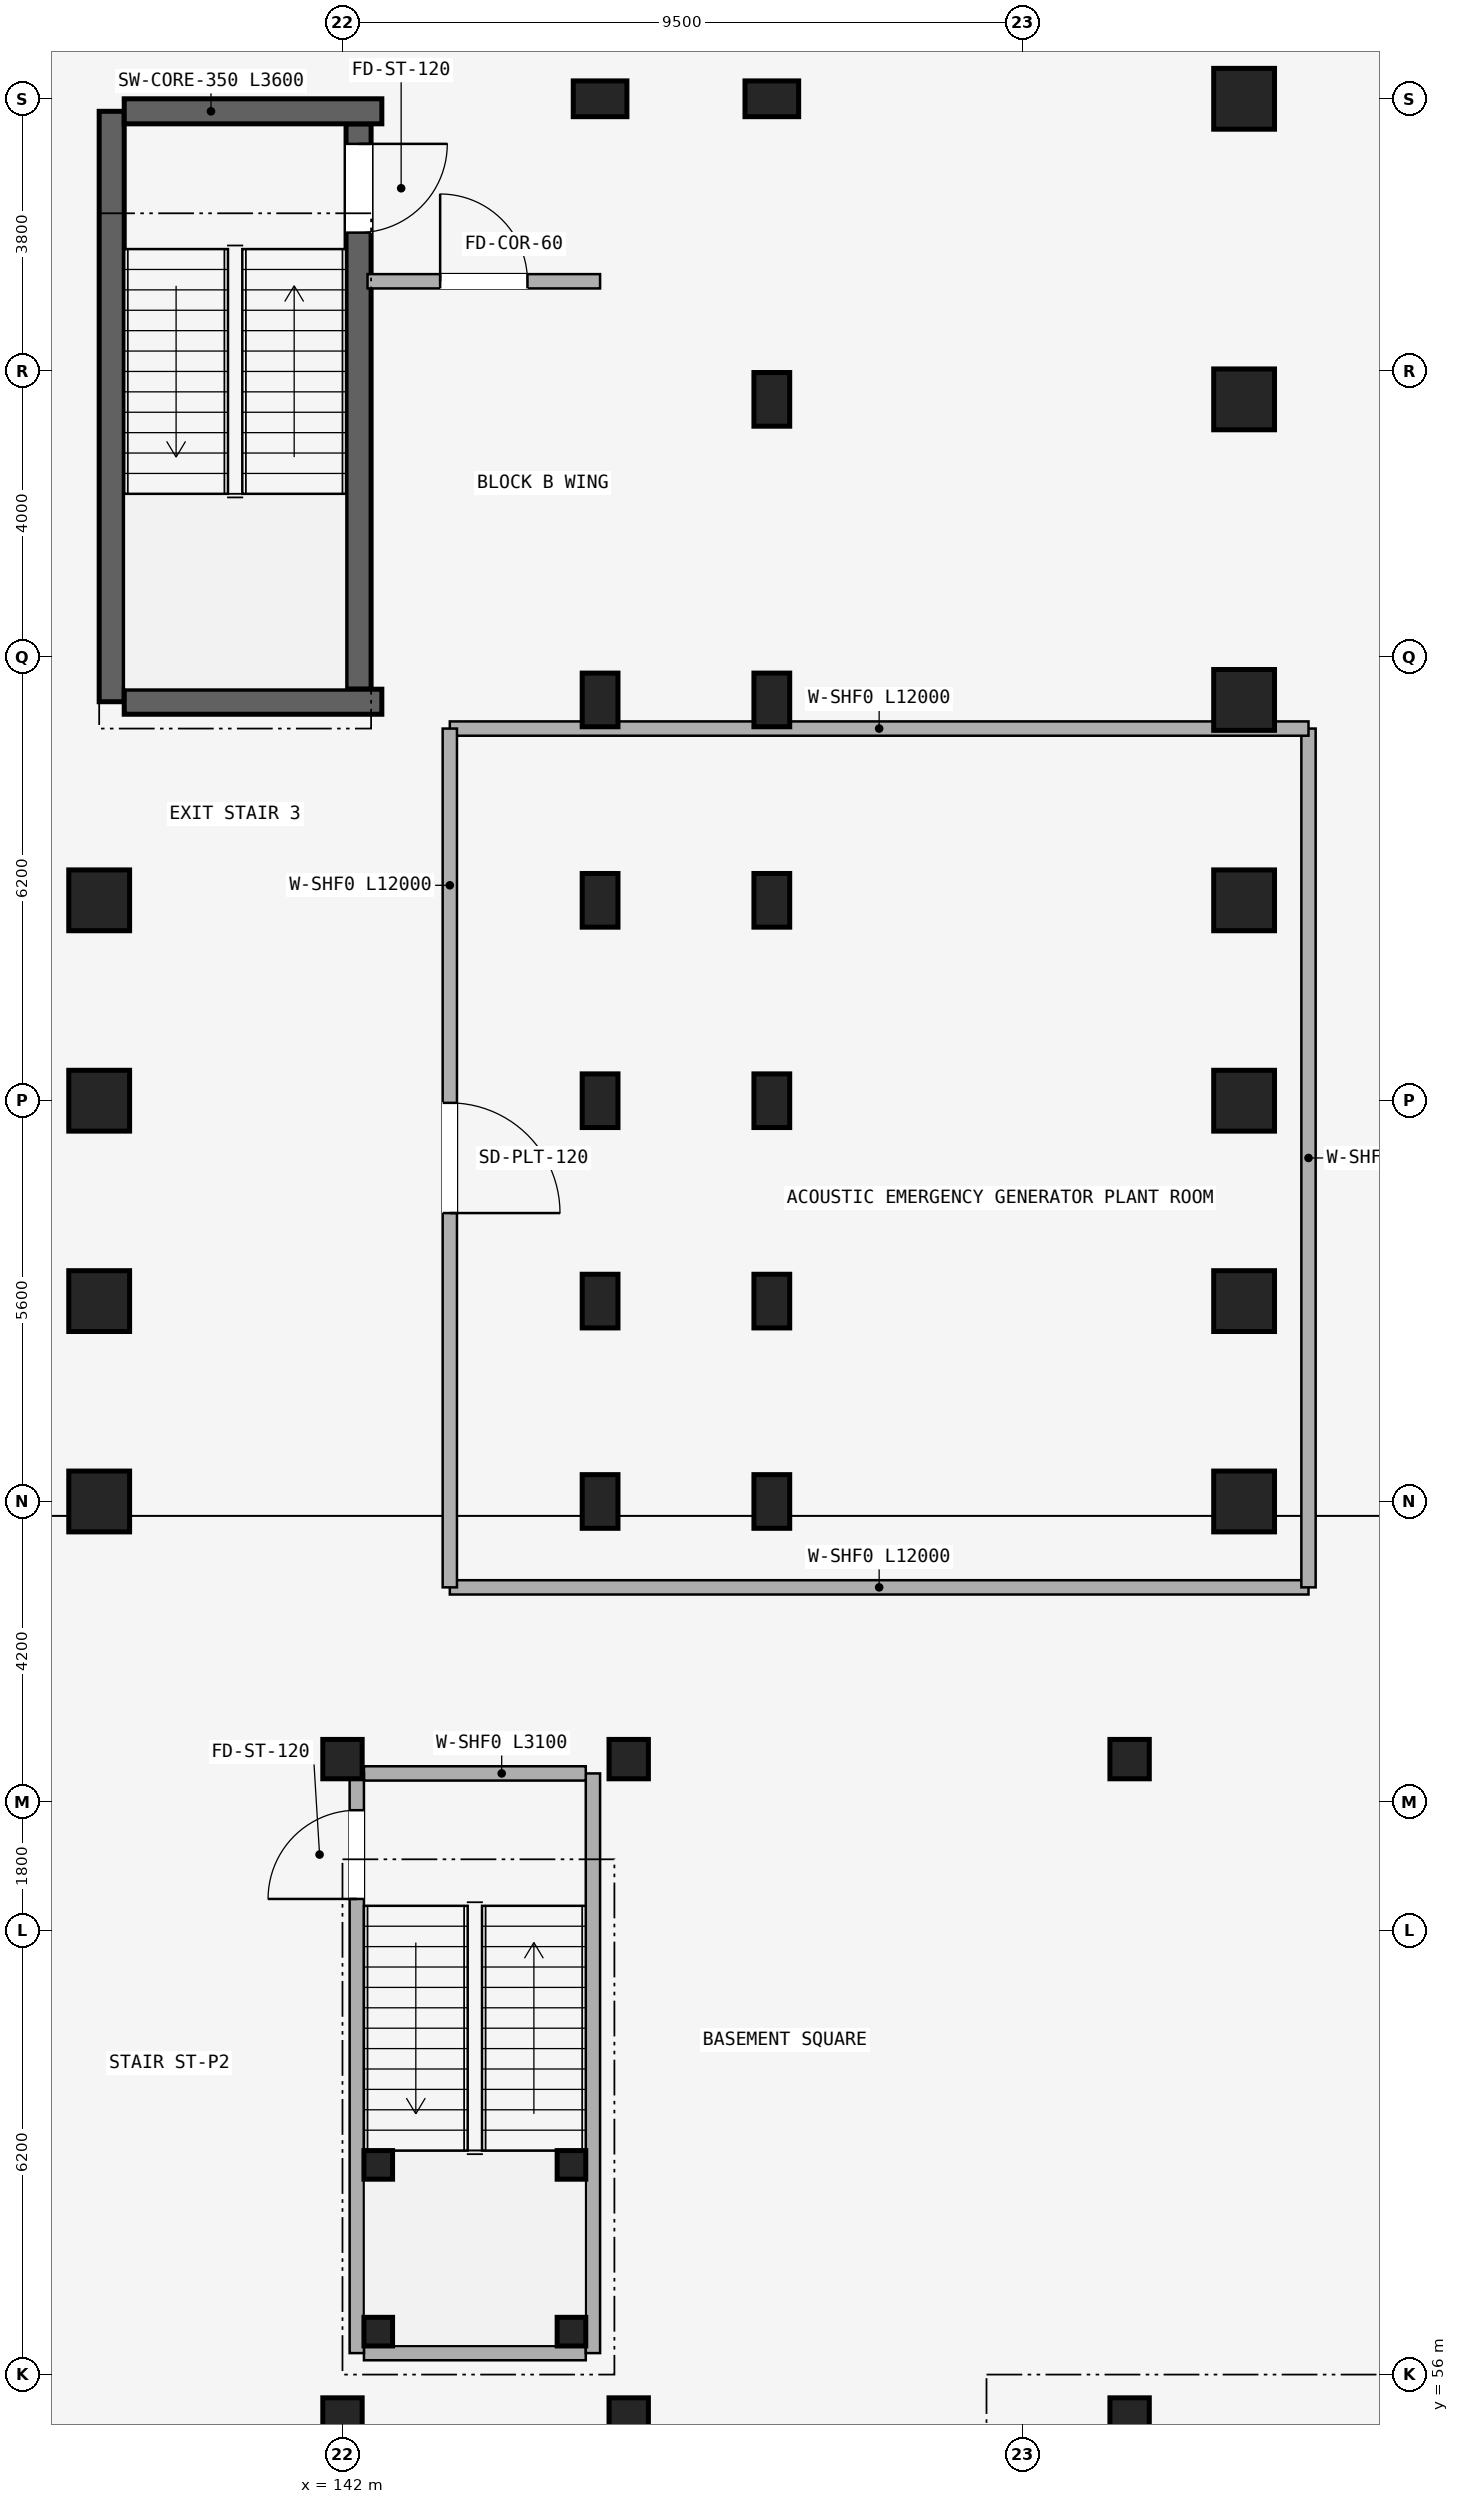
"""IFC4 building model, lengths in metres.
Left out: names, types, materials, properties, quantities, classifications, styles, units other than length and angle.
Written with IfcOpenShell. Run it as: python <this file> out.ifc"""

import sys

from ifc_helpers import new_model, si_unit, direction, frame, frame_2d, origin, origin_2d, place, context, subcontext, project, spatial, rectangle, extrude, element, fill, save


model = new_model("IFC4")
c1 = context("Model", 3, precision=1e-05, world=origin(), true_north=direction((0.0, 1.0)))
c2 = subcontext(c1, "Body", "Model", "MODEL_VIEW")
j1 = project(units=[si_unit("LENGTHUNIT", "METRE"), si_unit("PLANEANGLEUNIT", "RADIAN")], contexts=[c1])
p1 = place(None, origin())
s1 = spatial("IfcSite", under=j1, at=p1, CompositionType="ELEMENT")
p2 = place(p1, origin())
s2 = spatial("IfcBuilding", under=s1, at=p2, CompositionType="ELEMENT")
p3 = place(p2, frame((0.0, 0.0, -4.5)))
s3 = spatial("IfcBuildingStorey", under=s2, at=p3, CompositionType="ELEMENT", Elevation=-4.5)
p4 = place(p3, frame((138.775, 87.625, -0.5), z_axis=(0.0, 0.0, 1.0), x_axis=(0.0, -1.0, 0.0)))
e1 = element("IfcWall", 1, at=p4, inside=s3, PredefinedType="SHEAR", context=c2, shape_type="SweptSolid", body=[
    extrude(rectangle(XDim=8.25, YDim=0.35, at=frame_2d((4.125, 0.0))), origin(), (0.0, 0.0, 1.0), 4.78),
])
p5 = place(p3, frame((142.225, 87.45, 0.0), z_axis=(0.0, 0.0, 1.0), x_axis=(0.0, -1.0, 0.0)))
e2 = element("IfcWall", 2, at=p5, inside=s3, PredefinedType="SHEAR", context=c2, shape_type="SweptSolid", body=[
    extrude(rectangle(XDim=7.9, YDim=0.35, at=frame_2d((3.95, 0.0))), origin(), (0.0, 0.0, 1.0), 4.28),
])
p6 = place(p5, frame((0.28, 0.0, 0.0)))
e3 = element("IfcOpeningElement", 3, at=p6, cuts=e2, PredefinedType="OPENING", context=c2, shape_type="SweptSolid", body=[
    extrude(rectangle(XDim=1.24, YDim=2.15, at=frame_2d((0.62, 1.075))), frame((0.0, 0.185, 0.0), z_axis=(0.0, -1.0, 0.0), x_axis=(1.0, 0.0, 0.0)), (0.0, 0.0, 1.0), 0.37),
])
for number, where, z_axis, x_axis in (
    (4, (138.95, 87.625, -0.5), (0.0, 0.0, 1.0), (1.0, 0.0, 0.0)),
    (5, (138.95, 79.375, -0.5), (0.0, 0.0, 1.0), (1.0, 0.0, 0.0)),
):
    element("IfcWall", number, at=place(p3, frame(where, z_axis=z_axis, x_axis=x_axis)), inside=s3, PredefinedType="SHEAR", context=c2, shape_type="SweptSolid", body=[
        extrude(rectangle(XDim=3.6, YDim=0.35, at=frame_2d((1.8, 0.0))), origin(), (0.0, 0.0, 1.0), 4.78),
    ])
for number, where, z_axis, x_axis in (
    (6, (145.6, 87.8, -0.5), (0.0, 0.0, 1.0), (0.0, 1.0, 0.0)),
    (7, (148.0, 87.8, -0.5), (0.0, 0.0, 1.0), (0.0, 1.0, 0.0)),
):
    element("IfcColumn", number, at=place(p3, frame(where, z_axis=z_axis, x_axis=x_axis)), inside=s3, PredefinedType="COLUMN", context=c2, shape_type="SweptSolid", body=[
        extrude(rectangle(XDim=0.5, YDim=0.75, at=origin_2d()), origin(), (0.0, 0.0, 1.0), 4.78),
    ])
p7 = place(p3, frame((154.6, 87.8, -0.5), z_axis=(0.0, 0.0, 1.0), x_axis=(0.0, 1.0, 0.0)))
e8 = element("IfcColumn", 8, at=p7, inside=s3, PredefinedType="COLUMN", context=c2, shape_type="SweptSolid", body=[
    extrude(rectangle(XDim=0.85, YDim=0.85, at=origin_2d()), origin(), (0.0, 0.0, 1.0), 4.78),
])
p8 = place(p3, frame((148.0, 83.6, -0.5), z_axis=(0.0, 0.0, 1.0), x_axis=(1.0, 0.0, 0.0)))
e9 = element("IfcColumn", 9, at=p8, inside=s3, PredefinedType="COLUMN", context=c2, shape_type="SweptSolid", body=[
    extrude(rectangle(XDim=0.5, YDim=0.75, at=origin_2d()), origin(), (0.0, 0.0, 1.0), 4.78),
])
p9 = place(p3, frame((154.6, 83.6, -0.5), z_axis=(0.0, 0.0, 1.0), x_axis=(1.0, 0.0, 0.0)))
e10 = element("IfcColumn", 10, at=p9, inside=s3, PredefinedType="COLUMN", context=c2, shape_type="SweptSolid", body=[
    extrude(rectangle(XDim=0.85, YDim=0.85, at=origin_2d()), origin(), (0.0, 0.0, 1.0), 4.78),
])
for number, where, z_axis, x_axis in (
    (11, (145.6, 79.4, -0.5), (0.0, 0.0, 1.0), (1.0, 0.0, 0.0)),
    (12, (148.0, 79.4, -0.5), (0.0, 0.0, 1.0), (1.0, 0.0, 0.0)),
):
    element("IfcColumn", number, at=place(p3, frame(where, z_axis=z_axis, x_axis=x_axis)), inside=s3, PredefinedType="COLUMN", context=c2, shape_type="SweptSolid", body=[
        extrude(rectangle(XDim=0.5, YDim=0.75, at=origin_2d()), origin(), (0.0, 0.0, 1.0), 4.78),
    ])
for number, where, z_axis, x_axis in (
    (13, (154.6, 79.4, -0.5), (0.0, 0.0, 1.0), (1.0, 0.0, 0.0)),
    (14, (138.6, 76.6, -0.5), (0.0, 0.0, 1.0), (1.0, 0.0, 0.0)),
):
    element("IfcColumn", number, at=place(p3, frame(where, z_axis=z_axis, x_axis=x_axis)), inside=s3, PredefinedType="COLUMN", context=c2, shape_type="SweptSolid", body=[
        extrude(rectangle(XDim=0.85, YDim=0.85, at=origin_2d()), origin(), (0.0, 0.0, 1.0), 4.78),
    ])
for number, where, z_axis, x_axis in (
    (15, (145.6, 76.6, -0.5), (0.0, 0.0, 1.0), (1.0, 0.0, 0.0)),
    (16, (148.0, 76.6, -0.5), (0.0, 0.0, 1.0), (1.0, 0.0, 0.0)),
):
    element("IfcColumn", number, at=place(p3, frame(where, z_axis=z_axis, x_axis=x_axis)), inside=s3, PredefinedType="COLUMN", context=c2, shape_type="SweptSolid", body=[
        extrude(rectangle(XDim=0.5, YDim=0.75, at=origin_2d()), origin(), (0.0, 0.0, 1.0), 4.78),
    ])
for number, where, z_axis, x_axis in (
    (17, (154.6, 76.6, -0.5), (0.0, 0.0, 1.0), (1.0, 0.0, 0.0)),
    (18, (138.6, 73.8, -0.5), (0.0, 0.0, 1.0), (1.0, 0.0, 0.0)),
):
    element("IfcColumn", number, at=place(p3, frame(where, z_axis=z_axis, x_axis=x_axis)), inside=s3, PredefinedType="COLUMN", context=c2, shape_type="SweptSolid", body=[
        extrude(rectangle(XDim=0.85, YDim=0.85, at=origin_2d()), origin(), (0.0, 0.0, 1.0), 4.78),
    ])
for number, where, z_axis, x_axis in (
    (19, (145.6, 73.8, -0.5), (0.0, 0.0, 1.0), (1.0, 0.0, 0.0)),
    (20, (148.0, 73.8, -0.5), (0.0, 0.0, 1.0), (1.0, 0.0, 0.0)),
):
    element("IfcColumn", number, at=place(p3, frame(where, z_axis=z_axis, x_axis=x_axis)), inside=s3, PredefinedType="COLUMN", context=c2, shape_type="SweptSolid", body=[
        extrude(rectangle(XDim=0.5, YDim=0.75, at=origin_2d()), origin(), (0.0, 0.0, 1.0), 4.78),
    ])
for number, where, z_axis, x_axis in (
    (21, (154.6, 73.8, -0.5), (0.0, 0.0, 1.0), (1.0, 0.0, 0.0)),
    (22, (138.6, 71.0, -0.5), (0.0, 0.0, 1.0), (1.0, 0.0, 0.0)),
):
    element("IfcColumn", number, at=place(p3, frame(where, z_axis=z_axis, x_axis=x_axis)), inside=s3, PredefinedType="COLUMN", context=c2, shape_type="SweptSolid", body=[
        extrude(rectangle(XDim=0.85, YDim=0.85, at=origin_2d()), origin(), (0.0, 0.0, 1.0), 4.78),
    ])
for number, where, z_axis, x_axis in (
    (23, (145.6, 71.0, -0.5), (0.0, 0.0, 1.0), (1.0, 0.0, 0.0)),
    (24, (148.0, 71.0, -0.5), (0.0, 0.0, 1.0), (1.0, 0.0, 0.0)),
):
    element("IfcColumn", number, at=place(p3, frame(where, z_axis=z_axis, x_axis=x_axis)), inside=s3, PredefinedType="COLUMN", context=c2, shape_type="SweptSolid", body=[
        extrude(rectangle(XDim=0.5, YDim=0.75, at=origin_2d()), origin(), (0.0, 0.0, 1.0), 4.78),
    ])
for number, where, z_axis, x_axis in (
    (25, (154.6, 71.0, -0.5), (0.0, 0.0, 1.0), (1.0, 0.0, 0.0)),
    (26, (138.6, 68.2, -0.5), (0.0, 0.0, 1.0), (1.0, 0.0, 0.0)),
):
    element("IfcColumn", number, at=place(p3, frame(where, z_axis=z_axis, x_axis=x_axis)), inside=s3, PredefinedType="COLUMN", context=c2, shape_type="SweptSolid", body=[
        extrude(rectangle(XDim=0.85, YDim=0.85, at=origin_2d()), origin(), (0.0, 0.0, 1.0), 4.78),
    ])
for number, where, z_axis, x_axis in (
    (27, (145.6, 68.2, -0.5), (0.0, 0.0, 1.0), (1.0, 0.0, 0.0)),
    (28, (148.0, 68.2, -0.5), (0.0, 0.0, 1.0), (1.0, 0.0, 0.0)),
):
    element("IfcColumn", number, at=place(p3, frame(where, z_axis=z_axis, x_axis=x_axis)), inside=s3, PredefinedType="COLUMN", context=c2, shape_type="SweptSolid", body=[
        extrude(rectangle(XDim=0.5, YDim=0.75, at=origin_2d()), origin(), (0.0, 0.0, 1.0), 4.78),
    ])
p10 = place(p3, frame((154.6, 68.2, -0.5), z_axis=(0.0, 0.0, 1.0), x_axis=(1.0, 0.0, 0.0)))
e29 = element("IfcColumn", 29, at=p10, inside=s3, PredefinedType="COLUMN", context=c2, shape_type="SweptSolid", body=[
    extrude(rectangle(XDim=0.85, YDim=0.85, at=origin_2d()), origin(), (0.0, 0.0, 1.0), 4.78),
])
for number, where, z_axis, x_axis in (
    (30, (142.0, 55.4, -0.5), (0.0, 0.0, 1.0), (1.0, 0.0, 0.0)),
    (31, (142.0, 64.6, -0.5), (0.0, 0.0, 1.0), (1.0, 0.0, 0.0)),
    (32, (146.0, 55.4, -0.5), (0.0, 0.0, 1.0), (1.0, 0.0, 0.0)),
    (33, (146.0, 64.6, -0.5), (0.0, 0.0, 1.0), (1.0, 0.0, 0.0)),
    (34, (153.0, 55.4, -0.5), (0.0, 0.0, 1.0), (1.0, 0.0, 0.0)),
    (35, (153.0, 64.6, -0.5), (0.0, 0.0, 1.0), (1.0, 0.0, 0.0)),
):
    element("IfcColumn", number, at=place(p3, frame(where, z_axis=z_axis, x_axis=x_axis)), inside=s3, PredefinedType="COLUMN", context=c2, shape_type="SweptSolid", body=[
        extrude(rectangle(XDim=0.55, YDim=0.55, at=origin_2d()), origin(), (0.0, 0.0, 1.0), 4.7),
    ])
for number, where, z_axis, x_axis in (
    (36, (142.5, 56.6, 0.0), (0.0, 0.0, 1.0), (1.0, 0.0, 0.0)),
    (37, (145.2, 56.6, 0.0), (0.0, 0.0, 1.0), (1.0, 0.0, 0.0)),
    (38, (142.5, 58.93, 0.0), (0.0, 0.0, 1.0), (1.0, 0.0, 0.0)),
    (39, (145.2, 58.93, 0.0), (0.0, 0.0, 1.0), (1.0, 0.0, 0.0)),
):
    element("IfcColumn", number, at=place(p3, frame(where, z_axis=z_axis, x_axis=x_axis)), inside=s3, PredefinedType="COLUMN", context=c2, shape_type="SweptSolid", body=[
        extrude(rectangle(XDim=0.4, YDim=0.4, at=origin_2d()), origin(), (0.0, 0.0, 1.0), 2.05),
    ])
p11 = place(p3, frame((142.35, 85.25, 0.0), z_axis=(0.0, 0.0, 1.0), x_axis=(1.0, 0.0, 0.0)))
e40 = element("IfcWall", 40, at=p11, inside=s3, PredefinedType="STANDARD", context=c2, shape_type="SweptSolid", body=[
    extrude(rectangle(XDim=3.25, YDim=0.2, at=frame_2d((1.625, 0.0))), origin(), (0.0, 0.0, 1.0), 3.622),
])
p12 = place(p11, frame((1.015, 0.0, 0.0)))
e41 = element("IfcOpeningElement", 41, at=p12, cuts=e40, PredefinedType="OPENING", context=c2, shape_type="SweptSolid", body=[
    extrude(rectangle(XDim=1.22, YDim=2.15, at=frame_2d((0.61, 1.075))), frame((0.0, 0.11, 0.0), z_axis=(0.0, -1.0, 0.0), x_axis=(1.0, 0.0, 0.0)), (0.0, 0.0, 1.0), 0.22),
])
p13 = place(p3, frame((142.3, 56.3, 0.0), z_axis=(0.0, 0.0, 1.0), x_axis=(1.0, 0.0, 0.0)))
e42 = element("IfcWall", 42, at=p13, inside=s3, PredefinedType="STANDARD", context=c2, shape_type="SweptSolid", body=[
    extrude(rectangle(XDim=3.1, YDim=0.2, at=frame_2d((1.55, 0.0))), origin(), (0.0, 0.0, 1.0), 4.18),
])
p14 = place(p3, frame((145.5, 56.3, 0.0), z_axis=(0.0, 0.0, 1.0), x_axis=(0.0, 1.0, 0.0)))
e43 = element("IfcWall", 43, at=p14, inside=s3, PredefinedType="STANDARD", context=c2, shape_type="SweptSolid", body=[
    extrude(rectangle(XDim=8.1, YDim=0.2, at=frame_2d((4.05, 0.0))), origin(), (0.0, 0.0, 1.0), 4.18),
])
p15 = place(p3, frame((142.3, 64.4, 0.0), z_axis=(0.0, 0.0, 1.0), x_axis=(1.0, 0.0, 0.0)))
e44 = element("IfcWall", 44, at=p15, inside=s3, PredefinedType="STANDARD", context=c2, shape_type="SweptSolid", body=[
    extrude(rectangle(XDim=3.1, YDim=0.2, at=frame_2d((1.55, 0.0))), origin(), (0.0, 0.0, 1.0), 4.18),
])
p16 = place(p3, frame((142.2, 56.3, 0.0), z_axis=(0.0, 0.0, 1.0), x_axis=(0.0, 1.0, 0.0)))
e45 = element("IfcWall", 45, at=p16, inside=s3, PredefinedType="STANDARD", context=c2, shape_type="SweptSolid", body=[
    extrude(rectangle(XDim=8.1, YDim=0.2, at=frame_2d((4.05, 0.0))), origin(), (0.0, 0.0, 1.0), 4.18),
])
p17 = place(p16, frame((6.346, 0.0, 0.0)))
e46 = element("IfcOpeningElement", 46, at=p17, cuts=e45, PredefinedType="OPENING", context=c2, shape_type="SweptSolid", body=[
    extrude(rectangle(XDim=1.24, YDim=2.15, at=frame_2d((0.62, 1.075))), frame((0.0, 0.11, 0.0), z_axis=(0.0, -1.0, 0.0), x_axis=(1.0, 0.0, 0.0)), (0.0, 0.0, 1.0), 0.22),
])
p18 = place(p3, frame((143.5, 67.0, 0.0), z_axis=(0.0, 0.0, 1.0), x_axis=(1.0, 0.0, 0.0)))
e47 = element("IfcWall", 47, at=p18, inside=s3, PredefinedType="STANDARD", context=c2, shape_type="SweptSolid", body=[
    extrude(rectangle(XDim=12.0, YDim=0.2, at=frame_2d((6.0, 0.0))), origin(), (0.0, 0.0, 1.0), 4.18),
])
for number, where, z_axis, x_axis in (
    (48, (155.5, 67.0, 0.0), (0.0, 0.0, 1.0), (0.0, 1.0, 0.0)),
    (49, (155.5, 79.0, 0.0), (0.0, 0.0, 1.0), (-1.0, 0.0, 0.0)),
):
    element("IfcWall", number, at=place(p3, frame(where, z_axis=z_axis, x_axis=x_axis)), inside=s3, PredefinedType="STANDARD", context=c2, shape_type="SweptSolid", body=[
        extrude(rectangle(XDim=12.0, YDim=0.2, at=frame_2d((6.0, 0.0))), origin(), (0.0, 0.0, 1.0), 3.622),
    ])
p19 = place(p3, frame((143.5, 79.0, 0.0), z_axis=(0.0, 0.0, 1.0), x_axis=(0.0, -1.0, 0.0)))
e50 = element("IfcWall", 50, at=p19, inside=s3, PredefinedType="STANDARD", context=c2, shape_type="SweptSolid", body=[
    extrude(rectangle(XDim=12.0, YDim=0.2, at=frame_2d((6.0, 0.0))), origin(), (0.0, 0.0, 1.0), 3.622),
])
p20 = place(p19, frame((5.23, 0.0, 0.0)))
e51 = element("IfcOpeningElement", 51, at=p20, cuts=e50, PredefinedType="OPENING", context=c2, shape_type="SweptSolid", body=[
    extrude(rectangle(XDim=1.54, YDim=2.15, at=frame_2d((0.77, 1.075))), frame((0.0, 0.11, 0.0), z_axis=(0.0, -1.0, 0.0), x_axis=(1.0, 0.0, 0.0)), (0.0, 0.0, 1.0), 0.22),
])
p21 = place(p6, frame((1.24, 0.0, 0.0), z_axis=(0.0, 0.0, 1.0), x_axis=(-1.0, 0.0, 0.0)))
e52 = element("IfcDoor", 52, at=p21, inside=s3, OperationType="SINGLE_SWING_RIGHT", PredefinedType="DOOR", context=c2, shape_type="SweptSolid", body=[
    extrude(rectangle(XDim=1.24, YDim=2.15, at=frame_2d((0.62, 1.075))), frame((0.0, 0.025, 0.0), z_axis=(0.0, -1.0, 0.0), x_axis=(1.0, 0.0, 0.0)), (0.0, 0.0, 1.0), 0.05),
])
fill(e3, e52)
p22 = place(p12, frame((1.22, 0.0, 0.0), z_axis=(0.0, 0.0, 1.0), x_axis=(-1.0, 0.0, 0.0)))
e53 = element("IfcDoor", 53, at=p22, inside=s3, OperationType="SINGLE_SWING_RIGHT", PredefinedType="DOOR", context=c2, shape_type="SweptSolid", body=[
    extrude(rectangle(XDim=1.22, YDim=2.15, at=frame_2d((0.61, 1.075))), frame((0.0, 0.025, 0.0), z_axis=(0.0, -1.0, 0.0), x_axis=(1.0, 0.0, 0.0)), (0.0, 0.0, 1.0), 0.05),
])
fill(e41, e53)
p23 = place(p17, frame((1.24, 0.0, 0.0), z_axis=(0.0, 0.0, 1.0), x_axis=(-1.0, 0.0, 0.0)))
e54 = element("IfcDoor", 54, at=p23, inside=s3, OperationType="SINGLE_SWING_RIGHT", PredefinedType="DOOR", context=c2, shape_type="SweptSolid", body=[
    extrude(rectangle(XDim=1.24, YDim=2.15, at=frame_2d((0.62, 1.075))), frame((0.0, 0.025, 0.0), z_axis=(0.0, -1.0, 0.0), x_axis=(1.0, 0.0, 0.0)), (0.0, 0.0, 1.0), 0.05),
])
fill(e46, e54)
p24 = place(p20, frame((1.54, 0.0, 0.0), z_axis=(0.0, 0.0, 1.0), x_axis=(-1.0, 0.0, 0.0)))
e55 = element("IfcDoor", 55, at=p24, inside=s3, OperationType="SINGLE_SWING_LEFT", PredefinedType="DOOR", context=c2, shape_type="SweptSolid", body=[
    extrude(rectangle(XDim=1.54, YDim=2.15, at=frame_2d((0.77, 1.075))), frame((0.0, 0.025, 0.0), z_axis=(0.0, -1.0, 0.0), x_axis=(1.0, 0.0, 0.0)), (0.0, 0.0, 1.0), 0.05),
])
fill(e51, e55)
save(model, sys.argv[1])
